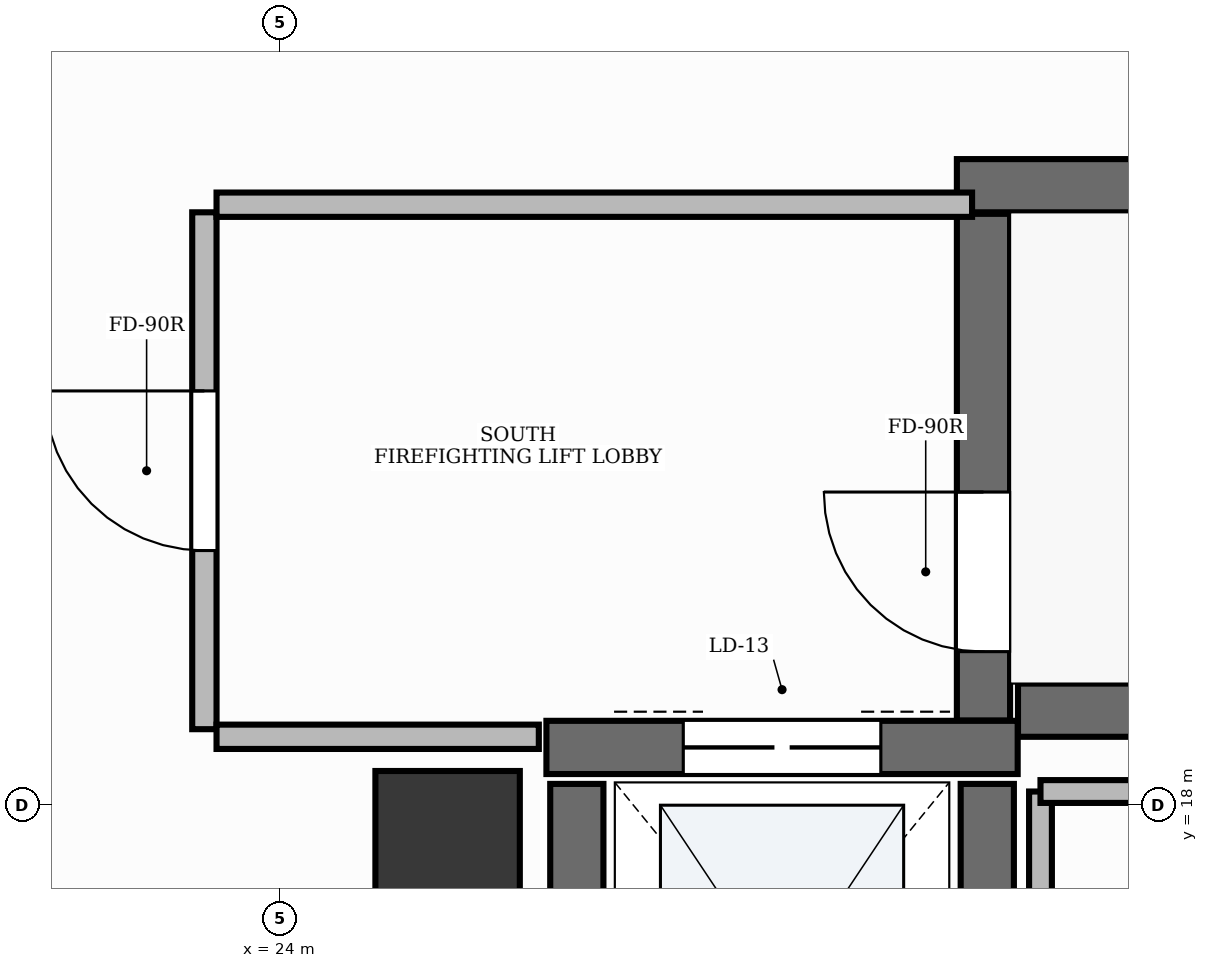
"""IFC4 building model, lengths in metres.
Left out: names, types, materials, properties, quantities, classifications, styles, units other than length and angle.
Written with IfcOpenShell. Run it as: python <this file> out.ifc"""

import sys

from ifc_helpers import new_model, si_unit, direction, frame, frame_2d, origin, origin_2d, place, context, subcontext, project, spatial, rectangle, extrude, element, fill, save


model = new_model("IFC4")
c1 = context("Model", 3, precision=1e-05, world=origin(), true_north=direction((0.0, 1.0)))
c2 = subcontext(c1, "Body", "Model", "MODEL_VIEW")
j1 = project(units=[si_unit("LENGTHUNIT", "METRE"), si_unit("PLANEANGLEUNIT", "RADIAN")], contexts=[c1])
p1 = place(None, origin())
s1 = spatial("IfcSite", under=j1, at=p1, CompositionType="ELEMENT")
p2 = place(p1, origin())
s2 = spatial("IfcBuilding", under=s1, at=p2, CompositionType="ELEMENT")
p3 = place(p2, frame((0.0, 0.0, 291.0)))
s3 = spatial("IfcBuildingStorey", under=s2, at=p3, CompositionType="ELEMENT", Elevation=291.0)
p4 = place(p3, frame((28.852, 18.625, 0.0), z_axis=(0.0, 0.0, 1.0), x_axis=(1.0, 0.0, 0.0)))
e1 = element("IfcWall", 1, at=p4, inside=s3, PredefinedType="SHEAR", context=c2, shape_type="SweptSolid", body=[
    extrude(rectangle(XDim=8.148, YDim=0.35, at=frame_2d((4.074, 0.0))), origin(), (0.0, 0.0, 1.0), 6.3),
])
p5 = place(p3, frame((28.45, 22.075, 0.0), z_axis=(0.0, 0.0, 1.0), x_axis=(1.0, 0.0, 0.0)))
e2 = element("IfcWall", 2, at=p5, inside=s3, PredefinedType="SHEAR", context=c2, shape_type="SweptSolid", body=[
    extrude(rectangle(XDim=8.55, YDim=0.35, at=frame_2d((4.275, 0.0))), origin(), (0.0, 0.0, 1.0), 6.3),
])
p6 = place(p3, frame((28.625, 18.557, 0.0), z_axis=(0.0, 0.0, 1.0), x_axis=(0.0, 1.0, 0.0)))
e3 = element("IfcWall", 3, at=p6, inside=s3, PredefinedType="SHEAR", context=c2, shape_type="SweptSolid", body=[
    extrude(rectangle(XDim=3.333, YDim=0.35, at=frame_2d((1.667, 0.0))), origin(), (0.0, 0.0, 1.0), 6.3),
])
p7 = place(p6, frame((0.453, 0.0, 0.0)))
e4 = element("IfcOpeningElement", 4, at=p7, cuts=e3, PredefinedType="OPENING", context=c2, shape_type="SweptSolid", body=[
    extrude(rectangle(XDim=1.05, YDim=2.15, at=frame_2d((0.525, 1.075))), frame((0.0, 0.19, 0.0), z_axis=(0.0, -1.0, 0.0), x_axis=(1.0, 0.0, 0.0)), (0.0, 0.0, 1.0), 0.38),
])
p8 = place(p3, frame((25.75, 18.38, 0.0), z_axis=(0.0, 0.0, 1.0), x_axis=(1.0, 0.0, 0.0)))
e5 = element("IfcWall", 5, at=p8, inside=s3, PredefinedType="SHEAR", context=c2, shape_type="SweptSolid", body=[
    extrude(rectangle(XDim=3.1, YDim=0.35, at=frame_2d((1.55, 0.0))), origin(), (0.0, 0.0, 1.0), 6.3),
])
p9 = place(p8, frame((0.9, 0.0, 0.0)))
e6 = element("IfcOpeningElement", 6, at=p9, cuts=e5, PredefinedType="OPENING", context=c2, shape_type="SweptSolid", body=[
    extrude(rectangle(XDim=1.3, YDim=2.2, at=frame_2d((0.65, 1.1))), frame((0.0, 0.19, 0.0), z_axis=(0.0, -1.0, 0.0), x_axis=(1.0, 0.0, 0.0)), (0.0, 0.0, 1.0), 0.38),
])
for number, where, z_axis, x_axis in (
    (7, (25.95, 15.44, 0.0), (0.0, 0.0, 1.0), (0.0, 1.0, 0.0)),
    (8, (28.65, 15.44, 0.0), (0.0, 0.0, 1.0), (0.0, 1.0, 0.0)),
):
    element("IfcWall", number, at=place(p3, frame(where, z_axis=z_axis, x_axis=x_axis)), inside=s3, PredefinedType="SHEAR", context=c2, shape_type="SweptSolid", body=[
        extrude(rectangle(XDim=2.7, YDim=0.35, at=frame_2d((1.35, 0.0))), origin(), (0.0, 0.0, 1.0), 6.3),
    ])
p10 = place(p3, frame((25.1, 17.75, -0.0), z_axis=(0.0, 0.0, 1.0), x_axis=(1.0, 0.0, 0.0)))
e9 = element("IfcColumn", 9, at=p10, inside=s3, PredefinedType="PILASTER", context=c2, shape_type="SweptSolid", body=[
    extrude(rectangle(XDim=0.95, YDim=0.95, at=origin_2d()), origin(), (0.0, 0.0, 1.0), 6.301),
])
p11 = place(p3, frame((23.5, 18.5, 0.0), z_axis=(0.0, 0.0, 1.0), x_axis=(0.0, 1.0, 0.0)))
e10 = element("IfcWall", 10, at=p11, inside=s3, PredefinedType="PARTITIONING", context=c2, shape_type="SweptSolid", body=[
    extrude(rectangle(XDim=3.4, YDim=0.16, at=frame_2d((1.7, 0.0))), origin(), (0.0, 0.0, 1.0), 4.61),
])
p12 = place(p11, frame((1.175, 0.0, 0.0)))
e11 = element("IfcOpeningElement", 11, at=p12, cuts=e10, PredefinedType="OPENING", context=c2, shape_type="SweptSolid", body=[
    extrude(rectangle(XDim=1.05, YDim=2.15, at=frame_2d((0.525, 1.075))), frame((0.0, 0.095, 0.0), z_axis=(0.0, -1.0, 0.0), x_axis=(1.0, 0.0, 0.0)), (0.0, 0.0, 1.0), 0.19),
])
p13 = place(p3, frame((23.58, 21.95, 0.0), z_axis=(0.0, 0.0, 1.0), x_axis=(1.0, 0.0, 0.0)))
e12 = element("IfcWall", 12, at=p13, inside=s3, PredefinedType="PARTITIONING", context=c2, shape_type="SweptSolid", body=[
    extrude(rectangle(XDim=4.97, YDim=0.16, at=frame_2d((2.485, 0.0))), origin(), (0.0, 0.0, 1.0), 4.61),
])
p14 = place(p3, frame((23.58, 18.45, 0.0), z_axis=(0.0, 0.0, 1.0), x_axis=(1.0, 0.0, 0.0)))
e13 = element("IfcWall", 13, at=p14, inside=s3, PredefinedType="PARTITIONING", context=c2, shape_type="SweptSolid", body=[
    extrude(rectangle(XDim=2.12, YDim=0.16, at=frame_2d((1.06, 0.0))), origin(), (0.0, 0.0, 1.0), 4.61),
])
p15 = place(p3, frame((29.0, 14.954, 0.0), z_axis=(0.0, 0.0, 1.0), x_axis=(0.0, 1.0, 0.0)))
e14 = element("IfcWall", 14, at=p15, inside=s3, PredefinedType="PARTITIONING", context=c2, shape_type="SweptSolid", body=[
    extrude(rectangle(XDim=3.136, YDim=0.15, at=frame_2d((1.568, 0.0))), origin(), (0.0, 0.0, 1.0), 4.61),
])
p16 = place(p3, frame((29.0, 18.09, 0.0), z_axis=(0.0, 0.0, 1.0), x_axis=(1.0, 0.0, 0.0)))
e15 = element("IfcWall", 15, at=p16, inside=s3, PredefinedType="PARTITIONING", context=c2, shape_type="SweptSolid", body=[
    extrude(rectangle(XDim=2.945, YDim=0.15, at=frame_2d((1.473, 0.0))), origin(), (0.0, 0.0, 1.0), 4.61),
])
p17 = place(p7, origin())
e16 = element("IfcDoor", 16, at=p17, inside=s3, OperationType="SINGLE_SWING_RIGHT", PredefinedType="DOOR", context=c2, shape_type="SweptSolid", body=[
    extrude(rectangle(XDim=1.05, YDim=2.15, at=frame_2d((0.525, 1.075))), frame((0.0, 0.025, 0.0), z_axis=(0.0, -1.0, 0.0), x_axis=(1.0, 0.0, 0.0)), (0.0, 0.0, 1.0), 0.05),
])
fill(e4, e16)
p18 = place(p9, origin())
e17 = element("IfcDoor", 17, at=p18, inside=s3, OperationType="DOUBLE_DOOR_SLIDING", PredefinedType="DOOR", context=c2, shape_type="SweptSolid", body=[
    extrude(rectangle(XDim=1.3, YDim=2.2, at=frame_2d((0.65, 1.1))), frame((0.0, 0.025, 0.0), z_axis=(0.0, -1.0, 0.0), x_axis=(1.0, 0.0, 0.0)), (0.0, 0.0, 1.0), 0.05),
])
fill(e6, e17)
p19 = place(p12, origin())
e18 = element("IfcDoor", 18, at=p19, inside=s3, OperationType="SINGLE_SWING_RIGHT", PredefinedType="DOOR", context=c2, shape_type="SweptSolid", body=[
    extrude(rectangle(XDim=1.05, YDim=2.15, at=frame_2d((0.525, 1.075))), frame((0.0, 0.025, 0.0), z_axis=(0.0, -1.0, 0.0), x_axis=(1.0, 0.0, 0.0)), (0.0, 0.0, 1.0), 0.05),
])
fill(e11, e18)
save(model, sys.argv[1])
